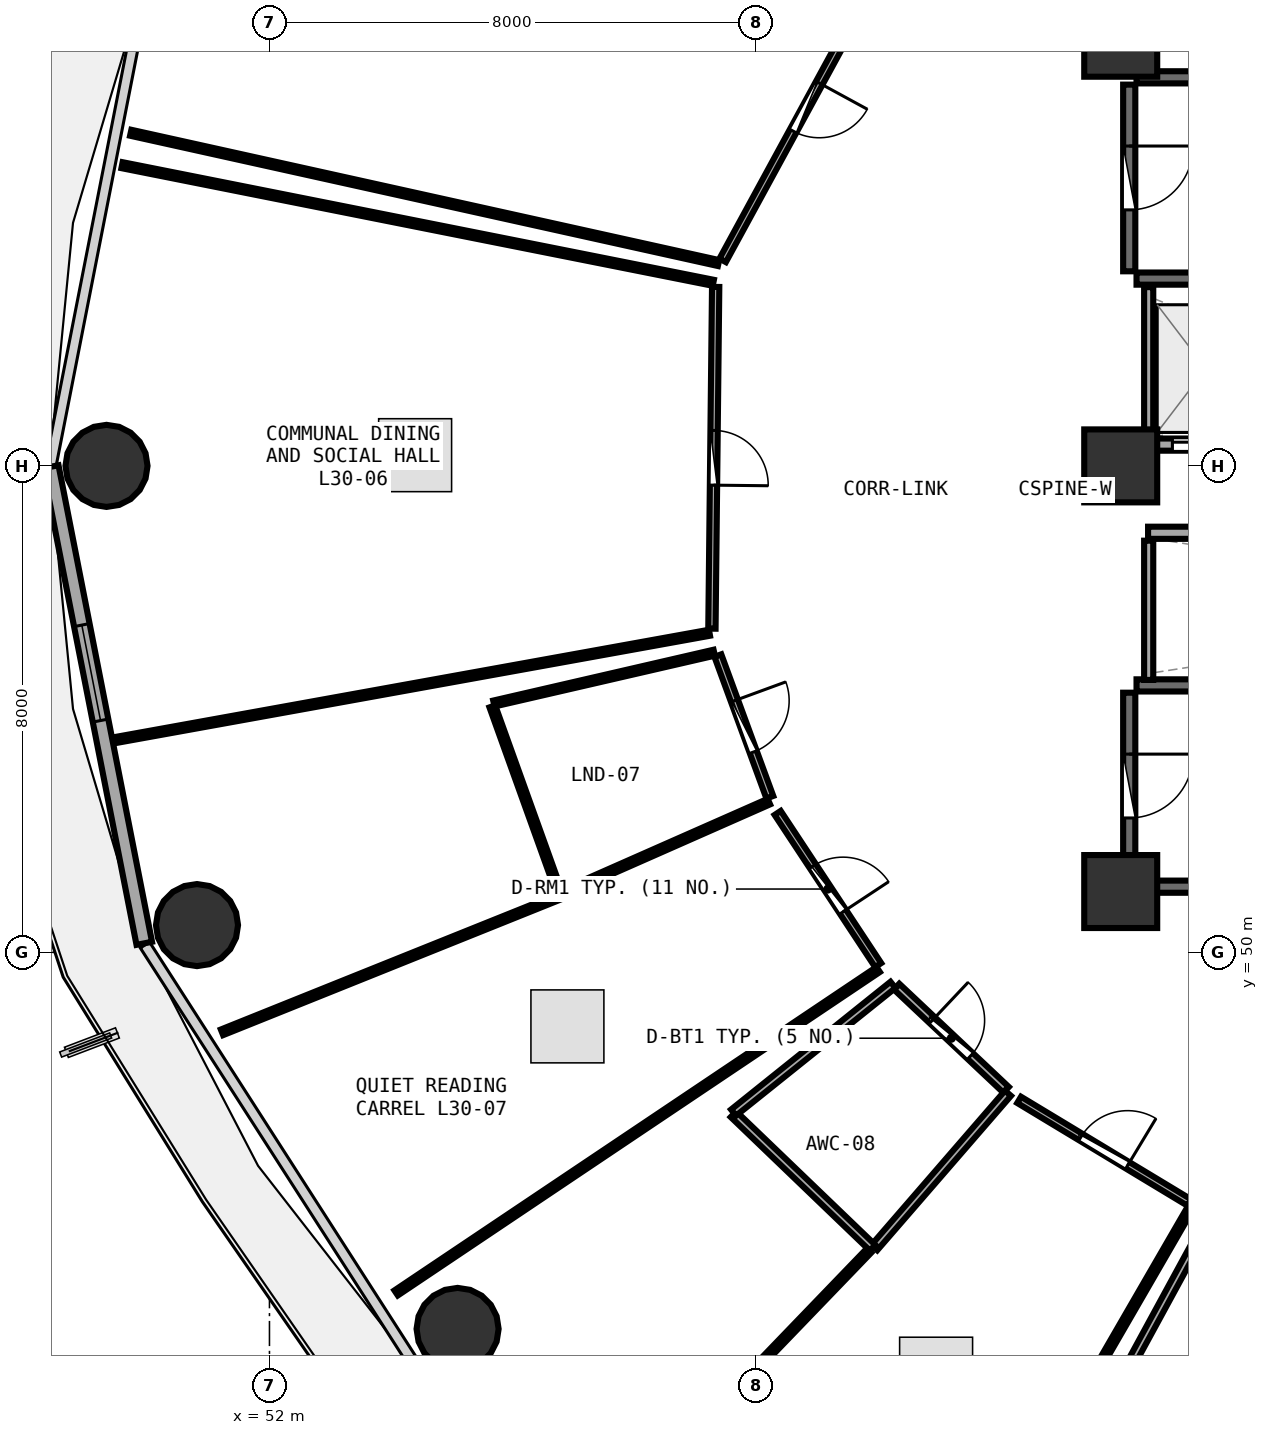
"""IFC4 building model, lengths in metres.
Left out: names, types, materials, properties, quantities, classifications, styles, units other than length and angle.
Written with IfcOpenShell. Run it as: python <this file> out.ifc"""

import sys

from ifc_helpers import new_model, si_unit, direction, frame, frame_2d, origin, origin_2d, place, context, subcontext, project, spatial, rectangle, circle, extrude, element, fill, save


model = new_model("IFC4")
c1 = context("Model", 3, precision=1e-05, world=origin(), true_north=direction((0.0, 1.0)))
c2 = subcontext(c1, "Body", "Model", "MODEL_VIEW")
j1 = project(units=[si_unit("LENGTHUNIT", "METRE"), si_unit("PLANEANGLEUNIT", "RADIAN")], contexts=[c1])
p1 = place(None, origin())
s1 = spatial("IfcSite", under=j1, at=p1, CompositionType="ELEMENT")
p2 = place(p1, origin())
s2 = spatial("IfcBuilding", under=s1, at=p2, CompositionType="ELEMENT")
p3 = place(p2, frame((0.0, 0.0, 117.6)))
s3 = spatial("IfcBuildingStorey", under=s2, at=p3, CompositionType="ELEMENT", Elevation=117.6)
for number, where, z_axis, x_axis in (
    (1, (66.0, 51.0, 0.0), (0.0, 0.0, 1.0), (1.0, 0.0, 0.0)),
    (2, (66.0, 65.0, 0.0), (0.0, 0.0, 1.0), (1.0, 0.0, 0.0)),
    (3, (66.0, 58.0, 0.0), (0.0, 0.0, 1.0), (1.0, 0.0, 0.0)),
):
    element("IfcColumn", number, at=place(p3, frame(where, z_axis=z_axis, x_axis=x_axis)), inside=s3, PredefinedType="PILASTER", context=c2, shape_type="SweptSolid", body=[
        extrude(rectangle(XDim=1.2, YDim=1.2, at=origin_2d()), origin(), (0.0, 0.0, 1.0), 3.75),
    ])
for number, where, z_axis, x_axis in (
    (4, (49.32, 58.0, 0.0), (0.0, 0.0, 1.0), (1.0, 0.0, 0.0)),
    (5, (50.808, 50.448, 0.0), (0.0, 0.0, 1.0), (1.0, 0.0, 0.0)),
    (6, (55.094, 43.807, 0.0), (0.0, 0.0, 1.0), (1.0, 0.0, 0.0)),
):
    element("IfcColumn", number, at=place(p3, frame(where, z_axis=z_axis, x_axis=x_axis)), inside=s3, PredefinedType="COLUMN", context=c2, shape_type="SweptSolid", body=[
        extrude(circle(Radius=0.675, at=origin_2d()), origin(), (0.0, 0.0, 1.0), 3.75),
    ])
p4 = place(p3, frame((48.403, 57.985, 0.0), z_axis=(0.0, 0.0, 1.0), x_axis=(0.192581843632, -0.981280914674, 0.0)))
e7 = element("IfcWall", 7, at=p4, inside=s3, PredefinedType="SOLIDWALL", context=c2, shape_type="SweptSolid", body=[
    extrude(rectangle(XDim=7.987, YDim=0.26, at=frame_2d((3.993, 0.0))), origin(), (0.0, 0.0, 1.0), 3.475),
])
p5 = place(p4, frame((2.653, 0.0, 0.85)))
e8 = element("IfcOpeningElement", 8, at=p5, cuts=e7, PredefinedType="OPENING", context=c2, shape_type="SweptSolid", body=[
    extrude(rectangle(XDim=1.6, YDim=1.45, at=frame_2d((0.8, 0.725))), frame((0.0, 0.14, 0.0), z_axis=(0.0, -1.0, 0.0), x_axis=(1.0, 0.0, 0.0)), (0.0, 0.0, 1.0), 0.28),
])
for number, where, z_axis, x_axis in (
    (9, (66.26, 61.08, 0.0), (0.0, 0.0, 1.0), (1.0, 0.0, 0.0)),
    (10, (73.42, 64.39, 0.0), (0.0, 0.0, 1.0), (-1.0, 0.0, 0.0)),
):
    element("IfcWall", number, at=place(p3, frame(where, z_axis=z_axis, x_axis=x_axis)), inside=s3, PredefinedType="SHEAR", context=c2, shape_type="SweptSolid", body=[
        extrude(rectangle(XDim=7.16, YDim=0.2, at=frame_2d((3.58, 0.0))), origin(), (0.0, 0.0, 1.0), 3.49),
    ])
p6 = place(p3, frame((66.14, 64.27, 0.0), z_axis=(0.0, 0.0, 1.0), x_axis=(0.0, -1.0, 0.0)))
e11 = element("IfcWall", 11, at=p6, inside=s3, PredefinedType="SHEAR", context=c2, shape_type="SweptSolid", body=[
    extrude(rectangle(XDim=3.07, YDim=0.2, at=frame_2d((1.535, 0.0))), origin(), (0.0, 0.0, 1.0), 3.49),
])
p7 = place(p6, frame((1.01, 0.0, 0.0)))
e12 = element("IfcOpeningElement", 12, at=p7, cuts=e11, PredefinedType="OPENING", context=c2, shape_type="SweptSolid", body=[
    extrude(rectangle(XDim=1.05, YDim=2.1, at=frame_2d((0.525, 1.05))), frame((0.0, 0.11, 0.0), z_axis=(0.0, -1.0, 0.0), x_axis=(1.0, 0.0, 0.0)), (0.0, 0.0, 1.0), 0.22),
])
for number, where, z_axis, x_axis in (
    (13, (66.26, 51.08, 0.0), (0.0, 0.0, 1.0), (1.0, 0.0, 0.0)),
    (14, (73.42, 54.39, 0.0), (0.0, 0.0, 1.0), (-1.0, 0.0, 0.0)),
):
    element("IfcWall", number, at=place(p3, frame(where, z_axis=z_axis, x_axis=x_axis)), inside=s3, PredefinedType="SHEAR", context=c2, shape_type="SweptSolid", body=[
        extrude(rectangle(XDim=7.16, YDim=0.2, at=frame_2d((3.58, 0.0))), origin(), (0.0, 0.0, 1.0), 3.49),
    ])
p8 = place(p3, frame((66.14, 54.27, 0.0), z_axis=(0.0, 0.0, 1.0), x_axis=(0.0, -1.0, 0.0)))
e15 = element("IfcWall", 15, at=p8, inside=s3, PredefinedType="SHEAR", context=c2, shape_type="SweptSolid", body=[
    extrude(rectangle(XDim=3.07, YDim=0.2, at=frame_2d((1.535, 0.0))), origin(), (0.0, 0.0, 1.0), 3.49),
])
p9 = place(p8, frame((1.01, 0.0, 0.0)))
e16 = element("IfcOpeningElement", 16, at=p9, cuts=e15, PredefinedType="OPENING", context=c2, shape_type="SweptSolid", body=[
    extrude(rectangle(XDim=1.05, YDim=2.1, at=frame_2d((0.525, 1.05))), frame((0.0, 0.11, 0.0), z_axis=(0.0, -1.0, 0.0), x_axis=(1.0, 0.0, 0.0)), (0.0, 0.0, 1.0), 0.22),
])
p10 = place(p3, frame((66.45, 58.35, 0.0), z_axis=(0.0, 0.0, 1.0), x_axis=(1.0, 0.0, 0.0)))
e17 = element("IfcWall", 17, at=p10, inside=s3, PredefinedType="SOLIDWALL", context=c2, shape_type="SweptSolid", body=[
    extrude(rectangle(XDim=6.0, YDim=0.2, at=frame_2d((3.0, 0.0))), origin(), (0.0, 0.0, 1.0), 3.48),
])
p11 = place(p10, frame((0.4, 0.0, 0.0)))
e18 = element("IfcOpeningElement", 18, at=p11, cuts=e17, PredefinedType="OPENING", context=c2, shape_type="SweptSolid", body=[
    extrude(rectangle(XDim=1.1, YDim=2.1, at=frame_2d((0.55, 1.05))), frame((0.0, 0.11, 0.0), z_axis=(0.0, -1.0, 0.0), x_axis=(1.0, 0.0, 0.0)), (0.0, 0.0, 1.0), 0.22),
])
p12 = place(p10, frame((2.4, 0.0, 0.0)))
e19 = element("IfcOpeningElement", 19, at=p12, cuts=e17, PredefinedType="OPENING", context=c2, shape_type="SweptSolid", body=[
    extrude(rectangle(XDim=1.1, YDim=2.1, at=frame_2d((0.55, 1.05))), frame((0.0, 0.11, 0.0), z_axis=(0.0, -1.0, 0.0), x_axis=(1.0, 0.0, 0.0)), (0.0, 0.0, 1.0), 0.22),
])
p13 = place(p10, frame((4.4, 0.0, 0.0)))
e20 = element("IfcOpeningElement", 20, at=p13, cuts=e17, PredefinedType="OPENING", context=c2, shape_type="SweptSolid", body=[
    extrude(rectangle(XDim=1.1, YDim=2.1, at=frame_2d((0.55, 1.05))), frame((0.0, 0.11, 0.0), z_axis=(0.0, -1.0, 0.0), x_axis=(1.0, 0.0, 0.0)), (0.0, 0.0, 1.0), 0.22),
])
p14 = place(p3, frame((66.46, 58.48, 0.0), z_axis=(0.0, 0.0, 1.0), x_axis=(0.0, 1.0, 0.0)))
e21 = element("IfcWall", 21, at=p14, inside=s3, PredefinedType="PARTITIONING", context=c2, shape_type="SweptSolid", body=[
    extrude(rectangle(XDim=2.46, YDim=0.15, at=frame_2d((1.23, 0.0))), origin(), (0.0, 0.0, 1.0), 3.48),
])
p15 = place(p3, frame((66.45, 56.9, 0.0), z_axis=(0.0, 0.0, 1.0), x_axis=(1.0, 0.0, 0.0)))
e22 = element("IfcWall", 22, at=p15, inside=s3, PredefinedType="SOLIDWALL", context=c2, shape_type="SweptSolid", body=[
    extrude(rectangle(XDim=14.4, YDim=0.2, at=frame_2d((7.2, 0.0))), origin(), (0.0, 0.0, 1.0), 3.48),
])
p16 = place(p3, frame((66.46, 54.48, 0.0), z_axis=(0.0, 0.0, 1.0), x_axis=(0.0, 1.0, 0.0)))
e23 = element("IfcWall", 23, at=p16, inside=s3, PredefinedType="PARTITIONING", context=c2, shape_type="SweptSolid", body=[
    extrude(rectangle(XDim=2.29, YDim=0.15, at=frame_2d((1.145, 0.0))), origin(), (0.0, 0.0, 1.0), 3.48),
])
p17 = place(p3, frame((62.199, 66.421, 0.0), z_axis=(0.0, 0.0, 1.0), x_axis=(-0.478256103777, -0.878220416069, 0.0)))
e24 = element("IfcWall", 24, at=p17, inside=s3, PredefinedType="PARTITIONING", context=c2, shape_type="SweptSolid", body=[
    extrude(rectangle(XDim=5.741, YDim=0.12, at=frame_2d((2.871, 0.0))), origin(), (0.0, 0.0, 1.0), 2.925),
])
p18 = place(p17, frame((2.42, 0.0, 0.0)))
e25 = element("IfcOpeningElement", 25, at=p18, cuts=e24, PredefinedType="OPENING", context=c2, shape_type="SweptSolid", body=[
    extrude(rectangle(XDim=0.9, YDim=2.08, at=frame_2d((0.45, 1.04))), frame((0.0, 0.07, 0.0), z_axis=(0.0, -1.0, 0.0), x_axis=(1.0, 0.0, 0.0)), (0.0, 0.0, 1.0), 0.14),
])
p19 = place(p3, frame((59.338, 60.943, 0.0), z_axis=(0.0, 0.0, 1.0), x_axis=(-0.010989779386, -0.999939610551, 0.0)))
e26 = element("IfcWall", 26, at=p19, inside=s3, PredefinedType="PARTITIONING", context=c2, shape_type="SweptSolid", body=[
    extrude(rectangle(XDim=5.62, YDim=0.12, at=frame_2d((2.81, 0.0))), origin(), (0.0, 0.0, 1.0), 2.925),
])
p20 = place(p19, frame((2.36, 0.0, 0.0)))
e27 = element("IfcOpeningElement", 27, at=p20, cuts=e26, PredefinedType="OPENING", context=c2, shape_type="SweptSolid", body=[
    extrude(rectangle(XDim=0.9, YDim=2.08, at=frame_2d((0.45, 1.04))), frame((0.0, 0.07, 0.0), z_axis=(0.0, -1.0, 0.0), x_axis=(1.0, 0.0, 0.0)), (0.0, 0.0, 1.0), 0.14),
])
p21 = place(p3, frame((59.375, 54.881, 0.0), z_axis=(0.0, 0.0, 1.0), x_axis=(0.344396316594, -0.938824359035, 0.0)))
e28 = element("IfcWall", 28, at=p21, inside=s3, PredefinedType="PARTITIONING", context=c2, shape_type="SweptSolid", body=[
    extrude(rectangle(XDim=2.481, YDim=0.12, at=frame_2d((1.241, 0.0))), origin(), (0.0, 0.0, 1.0), 3.235),
])
p22 = place(p21, frame((0.791, 0.0, 0.0)))
e29 = element("IfcOpeningElement", 29, at=p22, cuts=e28, PredefinedType="OPENING", context=c2, shape_type="SweptSolid", body=[
    extrude(rectangle(XDim=0.9, YDim=2.08, at=frame_2d((0.45, 1.04))), frame((0.0, 0.07, 0.0), z_axis=(0.0, -1.0, 0.0), x_axis=(1.0, 0.0, 0.0)), (0.0, 0.0, 1.0), 0.14),
])
p23 = place(p3, frame((60.358, 52.293, 0.0), z_axis=(0.0, 0.0, 1.0), x_axis=(0.551050840628, -0.834471671804, 0.0)))
e30 = element("IfcWall", 30, at=p23, inside=s3, PredefinedType="PARTITIONING", context=c2, shape_type="SweptSolid", body=[
    extrude(rectangle(XDim=3.0, YDim=0.12, at=frame_2d((1.5, 0.0))), origin(), (0.0, 0.0, 1.0), 2.925),
])
p24 = place(p23, frame((1.05, 0.0, 0.0)))
e31 = element("IfcOpeningElement", 31, at=p24, cuts=e30, PredefinedType="OPENING", context=c2, shape_type="SweptSolid", body=[
    extrude(rectangle(XDim=0.9, YDim=2.08, at=frame_2d((0.45, 1.04))), frame((0.0, 0.07, 0.0), z_axis=(0.0, -1.0, 0.0), x_axis=(1.0, 0.0, 0.0)), (0.0, 0.0, 1.0), 0.14),
])
p25 = place(p3, frame((62.314, 49.437, 0.0), z_axis=(0.0, 0.0, 1.0), x_axis=(0.727704720547, -0.68589054498, 0.0)))
e32 = element("IfcWall", 32, at=p25, inside=s3, PredefinedType="PLUMBINGWALL", context=c2, shape_type="SweptSolid", body=[
    extrude(rectangle(XDim=2.476, YDim=0.13, at=frame_2d((1.238, 0.0))), origin(), (0.0, 0.0, 1.0), 2.925),
])
p26 = place(p25, frame((0.808, 0.0, 0.0)))
e33 = element("IfcOpeningElement", 33, at=p26, cuts=e32, PredefinedType="OPENING", context=c2, shape_type="SweptSolid", body=[
    extrude(rectangle(XDim=0.86, YDim=2.05, at=frame_2d((0.43, 1.025))), frame((0.0, 0.075, 0.0), z_axis=(0.0, -1.0, 0.0), x_axis=(1.0, 0.0, 0.0)), (0.0, 0.0, 1.0), 0.15),
])
p27 = place(p3, frame((64.329, 47.574, 0.0), z_axis=(0.0, 0.0, 1.0), x_axis=(0.8562252486, -0.516602674848, 0.0)))
e34 = element("IfcWall", 34, at=p27, inside=s3, PredefinedType="PARTITIONING", context=c2, shape_type="SweptSolid", body=[
    extrude(rectangle(XDim=3.269, YDim=0.12, at=frame_2d((1.635, 0.0))), origin(), (0.0, 0.0, 1.0), 2.925),
])
p28 = place(p27, frame((1.185, 0.0, 0.0)))
e35 = element("IfcOpeningElement", 35, at=p28, cuts=e34, PredefinedType="OPENING", context=c2, shape_type="SweptSolid", body=[
    extrude(rectangle(XDim=0.9, YDim=2.08, at=frame_2d((0.45, 1.04))), frame((0.0, 0.07, 0.0), z_axis=(0.0, -1.0, 0.0), x_axis=(1.0, 0.0, 0.0)), (0.0, 0.0, 1.0), 0.14),
])
p29 = place(p3, frame((59.386, 61.336, 0.0), z_axis=(0.0, 0.0, 1.0), x_axis=(-0.976312199438, 0.216366562178, 0.0)))
e36 = element("IfcWall", 36, at=p29, inside=s3, PredefinedType="PARTITIONING", context=c2, shape_type="SweptSolid", body=[
    extrude(rectangle(XDim=9.903, YDim=0.1, at=frame_2d((4.951, 0.0))), origin(), (0.0, 0.0, 1.0), 2.975),
])
p30 = place(p3, frame((59.237, 55.256, 0.0), z_axis=(0.0, 0.0, 1.0), x_axis=(-0.984081766615, -0.177716281237, 0.0)))
e37 = element("IfcWall", 37, at=p30, inside=s3, PredefinedType="PARTITIONING", context=c2, shape_type="SweptSolid", body=[
    extrude(rectangle(XDim=9.924, YDim=0.1, at=frame_2d((4.962, 0.0))), origin(), (0.0, 0.0, 1.0), 2.975),
])
p31 = place(p3, frame((49.575, 62.945, 0.0), z_axis=(0.0, 0.0, 1.0), x_axis=(0.980780933509, -0.195112174059, 0.0)))
e38 = element("IfcWall", 38, at=p31, inside=s3, PredefinedType="PARTITIONING", context=c2, shape_type="SweptSolid", body=[
    extrude(rectangle(XDim=9.915, YDim=0.1, at=frame_2d((4.958, 0.0))), origin(), (0.0, 0.0, 1.0), 2.975),
])
p32 = place(p3, frame((60.213, 52.479, 0.0), z_axis=(0.0, 0.0, 1.0), x_axis=(-0.914847920866, -0.403798565732, 0.0)))
e39 = element("IfcWall", 39, at=p32, inside=s3, PredefinedType="PARTITIONING", context=c2, shape_type="SweptSolid", body=[
    extrude(rectangle(XDim=3.719, YDim=0.1, at=frame_2d((1.86, 0.0))), origin(), (0.0, 0.0, 1.0), 3.175),
])
p33 = place(p3, frame((56.76, 50.999, 0.0), z_axis=(0.0, 0.0, 1.0), x_axis=(-0.338198726163, 0.94107471628, 0.0)))
e40 = element("IfcWall", 40, at=p33, inside=s3, PredefinedType="PARTITIONING", context=c2, shape_type="SweptSolid", body=[
    extrude(rectangle(XDim=3.238, YDim=0.1, at=frame_2d((1.619, 0.0))), origin(), (0.0, 0.0, 1.0), 3.175),
])
p34 = place(p3, frame((55.691, 54.092, 0.0), z_axis=(0.0, 0.0, 1.0), x_axis=(0.974413318027, 0.224763621728, 0.0)))
e41 = element("IfcWall", 41, at=p34, inside=s3, PredefinedType="PARTITIONING", context=c2, shape_type="SweptSolid", body=[
    extrude(rectangle(XDim=3.719, YDim=0.1, at=frame_2d((1.86, 0.0))), origin(), (0.0, 0.0, 1.0), 3.175),
])
p35 = place(p3, frame((62.011, 49.718, 0.0), z_axis=(0.0, 0.0, 1.0), x_axis=(-0.830433607217, -0.557117603388, 0.0)))
e42 = element("IfcWall", 42, at=p35, inside=s3, PredefinedType="PARTITIONING", context=c2, shape_type="SweptSolid", body=[
    extrude(rectangle(XDim=9.546, YDim=0.1, at=frame_2d((4.773, 0.0))), origin(), (0.0, 0.0, 1.0), 2.975),
])
p36 = place(p3, frame((51.219, 48.685, 0.0), z_axis=(0.0, 0.0, 1.0), x_axis=(0.927926926295, 0.372762148637, 0.0)))
e43 = element("IfcWall", 43, at=p36, inside=s3, PredefinedType="PARTITIONING", context=c2, shape_type="SweptSolid", body=[
    extrude(rectangle(XDim=6.044, YDim=0.1, at=frame_2d((3.022, 0.0))), origin(), (0.0, 0.0, 1.0), 2.925),
])
p37 = place(p3, frame((64.146, 47.683, 0.0), z_axis=(0.0, 0.0, 1.0), x_axis=(-0.654725816563, -0.75586645985, 0.0)))
e44 = element("IfcWall", 44, at=p37, inside=s3, PredefinedType="PLUMBINGWALL", context=c2, shape_type="SweptSolid", body=[
    extrude(rectangle(XDim=3.36, YDim=0.13, at=frame_2d((1.68, 0.0))), origin(), (0.0, 0.0, 1.0), 3.235),
])
p38 = place(p3, frame((61.919, 45.142, 0.0), z_axis=(0.0, 0.0, 1.0), x_axis=(-0.721319622767, 0.692602340316, 0.0)))
e45 = element("IfcWall", 45, at=p38, inside=s3, PredefinedType="PLUMBINGWALL", context=c2, shape_type="SweptSolid", body=[
    extrude(rectangle(XDim=3.171, YDim=0.13, at=frame_2d((1.585, 0.0))), origin(), (0.0, 0.0, 1.0), 2.925),
])
p39 = place(p3, frame((59.633, 47.365, 0.0), z_axis=(0.0, 0.0, 1.0), x_axis=(0.780343931947, 0.625350579974, 0.0)))
e46 = element("IfcWall", 46, at=p39, inside=s3, PredefinedType="PLUMBINGWALL", context=c2, shape_type="SweptSolid", body=[
    extrude(rectangle(XDim=3.36, YDim=0.13, at=frame_2d((1.68, 0.0))), origin(), (0.0, 0.0, 1.0), 3.235),
])
p40 = place(p3, frame((67.16, 45.819, 0.0), z_axis=(0.0, 0.0, 1.0), x_axis=(-0.500668535271, -0.865639080558, 0.0)))
e47 = element("IfcWall", 47, at=p40, inside=s3, PredefinedType="PARTITIONING", context=c2, shape_type="SweptSolid", body=[
    extrude(rectangle(XDim=9.03, YDim=0.1, at=frame_2d((4.515, 0.0))), origin(), (0.0, 0.0, 1.0), 2.925),
])
p41 = place(p3, frame((57.806, 40.885, 0.0), z_axis=(0.0, 0.0, 1.0), x_axis=(0.693697879067, 0.720266098451, 0.0)))
e48 = element("IfcWall", 48, at=p41, inside=s3, PredefinedType="PARTITIONING", context=c2, shape_type="SweptSolid", body=[
    extrude(rectangle(XDim=5.844, YDim=0.1, at=frame_2d((2.922, 0.0))), origin(), (0.0, 0.0, 1.0), 2.975),
])
p42 = place(p3, frame((65.54, 42.089, 0.0), z_axis=(0.0, 0.0, 1.0), x_axis=(0.478075883312, 0.878318535496, 0.0)))
e49 = element("IfcWall", 49, at=p42, inside=s3, PredefinedType="PLUMBINGWALL", context=c2, shape_type="SweptSolid", body=[
    extrude(rectangle(XDim=4.1, YDim=0.13, at=frame_2d((2.05, 0.0))), origin(), (0.0, 0.0, 1.0), 2.925),
])
p43 = place(p5, origin())
e50 = element("IfcWindow", 50, at=p43, inside=s3, PartitioningType="SINGLE_PANEL", PredefinedType="WINDOW", context=c2, shape_type="SweptSolid", body=[
    extrude(rectangle(XDim=1.6, YDim=1.45, at=frame_2d((0.8, 0.725))), frame((0.0, 0.03, 0.0), z_axis=(0.0, -1.0, 0.0), x_axis=(1.0, 0.0, 0.0)), (0.0, 0.0, 1.0), 0.06),
])
fill(e8, e50)
p44 = place(p7, origin())
e51 = element("IfcDoor", 51, at=p44, inside=s3, OperationType="SINGLE_SWING_LEFT", PredefinedType="DOOR", context=c2, shape_type="SweptSolid", body=[
    extrude(rectangle(XDim=1.05, YDim=2.1, at=frame_2d((0.525, 1.05))), frame((0.0, 0.025, 0.0), z_axis=(0.0, -1.0, 0.0), x_axis=(1.0, 0.0, 0.0)), (0.0, 0.0, 1.0), 0.05),
])
fill(e12, e51)
p45 = place(p9, origin())
e52 = element("IfcDoor", 52, at=p45, inside=s3, OperationType="SINGLE_SWING_LEFT", PredefinedType="DOOR", context=c2, shape_type="SweptSolid", body=[
    extrude(rectangle(XDim=1.05, YDim=2.1, at=frame_2d((0.525, 1.05))), frame((0.0, 0.025, 0.0), z_axis=(0.0, -1.0, 0.0), x_axis=(1.0, 0.0, 0.0)), (0.0, 0.0, 1.0), 0.05),
])
fill(e16, e52)
p46 = place(p11, origin())
e53 = element("IfcDoor", 53, at=p46, inside=s3, OperationType="DOUBLE_DOOR_SLIDING", PredefinedType="DOOR", context=c2, shape_type="SweptSolid", body=[
    extrude(rectangle(XDim=1.1, YDim=2.1, at=frame_2d((0.55, 1.05))), frame((0.0, 0.025, 0.0), z_axis=(0.0, -1.0, 0.0), x_axis=(1.0, 0.0, 0.0)), (0.0, 0.0, 1.0), 0.05),
])
fill(e18, e53)
p47 = place(p18, origin())
e54 = element("IfcDoor", 54, at=p47, inside=s3, OperationType="SINGLE_SWING_LEFT", PredefinedType="DOOR", context=c2, shape_type="SweptSolid", body=[
    extrude(rectangle(XDim=0.9, YDim=2.08, at=frame_2d((0.45, 1.04))), frame((0.0, 0.025, 0.0), z_axis=(0.0, -1.0, 0.0), x_axis=(1.0, 0.0, 0.0)), (0.0, 0.0, 1.0), 0.05),
])
fill(e25, e54)
p48 = place(p20, origin())
e55 = element("IfcDoor", 55, at=p48, inside=s3, OperationType="SINGLE_SWING_RIGHT", PredefinedType="DOOR", context=c2, shape_type="SweptSolid", body=[
    extrude(rectangle(XDim=0.9, YDim=2.08, at=frame_2d((0.45, 1.04))), frame((0.0, 0.025, 0.0), z_axis=(0.0, -1.0, 0.0), x_axis=(1.0, 0.0, 0.0)), (0.0, 0.0, 1.0), 0.05),
])
fill(e27, e55)
p49 = place(p22, origin())
e56 = element("IfcDoor", 56, at=p49, inside=s3, OperationType="SINGLE_SWING_LEFT", PredefinedType="DOOR", context=c2, shape_type="SweptSolid", body=[
    extrude(rectangle(XDim=0.9, YDim=2.08, at=frame_2d((0.45, 1.04))), frame((0.0, 0.025, 0.0), z_axis=(0.0, -1.0, 0.0), x_axis=(1.0, 0.0, 0.0)), (0.0, 0.0, 1.0), 0.05),
])
fill(e29, e56)
p50 = place(p24, origin())
e57 = element("IfcDoor", 57, at=p50, inside=s3, OperationType="SINGLE_SWING_RIGHT", PredefinedType="DOOR", context=c2, shape_type="SweptSolid", body=[
    extrude(rectangle(XDim=0.9, YDim=2.08, at=frame_2d((0.45, 1.04))), frame((0.0, 0.025, 0.0), z_axis=(0.0, -1.0, 0.0), x_axis=(1.0, 0.0, 0.0)), (0.0, 0.0, 1.0), 0.05),
])
fill(e31, e57)
p51 = place(p26, origin())
e58 = element("IfcDoor", 58, at=p51, inside=s3, OperationType="SINGLE_SWING_LEFT", PredefinedType="DOOR", context=c2, shape_type="SweptSolid", body=[
    extrude(rectangle(XDim=0.86, YDim=2.05, at=frame_2d((0.43, 1.025))), frame((0.0, 0.025, 0.0), z_axis=(0.0, -1.0, 0.0), x_axis=(1.0, 0.0, 0.0)), (0.0, 0.0, 1.0), 0.05),
])
fill(e33, e58)
p52 = place(p28, origin())
e59 = element("IfcDoor", 59, at=p52, inside=s3, OperationType="SINGLE_SWING_RIGHT", PredefinedType="DOOR", context=c2, shape_type="SweptSolid", body=[
    extrude(rectangle(XDim=0.9, YDim=2.08, at=frame_2d((0.45, 1.04))), frame((0.0, 0.025, 0.0), z_axis=(0.0, -1.0, 0.0), x_axis=(1.0, 0.0, 0.0)), (0.0, 0.0, 1.0), 0.05),
])
fill(e35, e59)
save(model, sys.argv[1])
